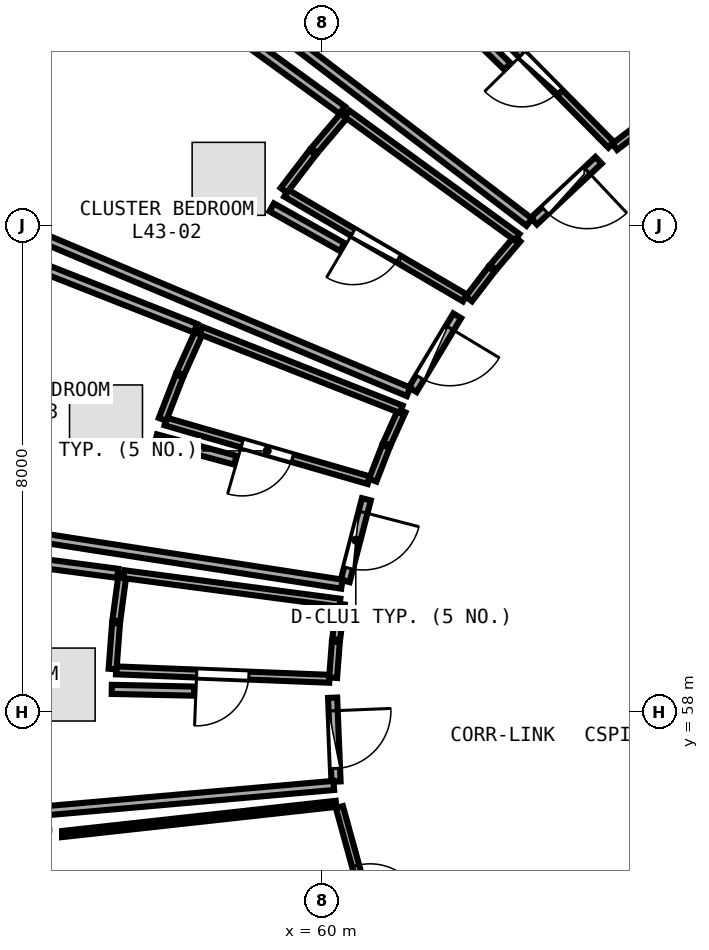
"""IFC4 building model, lengths in metres.
Left out: names, types, materials, properties, quantities, classifications, styles, units other than length and angle.
Written with IfcOpenShell. Run it as: python <this file> out.ifc"""

import sys

from ifc_helpers import new_model, si_unit, direction, frame, frame_2d, origin, place, context, subcontext, project, spatial, rectangle, extrude, element, fill, save


model = new_model("IFC4")
c1 = context("Model", 3, precision=1e-05, world=origin(), true_north=direction((0.0, 1.0)))
c2 = subcontext(c1, "Body", "Model", "MODEL_VIEW")
j1 = project(units=[si_unit("LENGTHUNIT", "METRE"), si_unit("PLANEANGLEUNIT", "RADIAN")], contexts=[c1])
p1 = place(None, origin())
s1 = spatial("IfcSite", under=j1, at=p1, CompositionType="ELEMENT")
p2 = place(p1, origin())
s2 = spatial("IfcBuilding", under=s1, at=p2, CompositionType="ELEMENT")
p3 = place(p2, frame((0.0, 0.0, 169.35)))
s3 = spatial("IfcBuildingStorey", under=s2, at=p3, CompositionType="ELEMENT", Elevation=169.35)
p4 = place(p3, frame((56.679, 71.1, 0.0), z_axis=(0.0, 0.0, 1.0), x_axis=(-0.538801521808, -0.842432739213, 0.0)))
e1 = element("IfcWall", 1, at=p4, inside=s3, PredefinedType="SOLIDWALL", context=c2, shape_type="SweptSolid", body=[
    extrude(rectangle(XDim=7.253, YDim=0.26, at=frame_2d((3.627, 0.0))), origin(), (0.0, 0.0, 1.0), 3.475),
])
p5 = place(p4, frame((3.152, 0.0, 0.0)))
e2 = element("IfcOpeningElement", 2, at=p5, cuts=e1, PredefinedType="OPENING", context=c2, shape_type="SweptSolid", body=[
    extrude(rectangle(XDim=0.95, YDim=2.1, at=frame_2d((0.475, 1.05))), frame((0.0, 0.14, 0.0), z_axis=(0.0, -1.0, 0.0), x_axis=(1.0, 0.0, 0.0)), (0.0, 0.0, 1.0), 0.28),
])
p6 = place(p4, frame((1.572, 0.0, 0.85)))
e3 = element("IfcOpeningElement", 3, at=p6, cuts=e1, PredefinedType="OPENING", context=c2, shape_type="SweptSolid", body=[
    extrude(rectangle(XDim=1.2, YDim=1.45, at=frame_2d((0.6, 0.725))), frame((0.0, 0.14, 0.0), z_axis=(0.0, -1.0, 0.0), x_axis=(1.0, 0.0, 0.0)), (0.0, 0.0, 1.0), 0.28),
])
p7 = place(p3, frame((64.758, 67.324, 0.0), z_axis=(0.0, 0.0, 1.0), x_axis=(-0.70286222458, 0.711326010531, 0.0)))
e4 = element("IfcWall", 4, at=p7, inside=s3, PredefinedType="PLUMBINGWALL", context=c2, shape_type="SweptSolid", body=[
    extrude(rectangle(XDim=3.317, YDim=0.13, at=frame_2d((1.659, 0.0))), origin(), (0.0, 0.0, 1.0), 3.175),
])
p8 = place(p7, frame((1.229, 0.0, 0.0)))
e5 = element("IfcOpeningElement", 5, at=p8, cuts=e4, PredefinedType="OPENING", context=c2, shape_type="SweptSolid", body=[
    extrude(rectangle(XDim=0.86, YDim=2.05, at=frame_2d((0.43, 1.025))), frame((0.0, 0.075, 0.0), z_axis=(0.0, -1.0, 0.0), x_axis=(1.0, 0.0, 0.0)), (0.0, 0.0, 1.0), 0.15),
])
p9 = place(p3, frame((64.55, 67.072, 0.0), z_axis=(0.0, 0.0, 1.0), x_axis=(-0.728239210945, -0.685323027223, 0.0)))
e6 = element("IfcWall", 6, at=p9, inside=s3, PredefinedType="PARTITIONING", context=c2, shape_type="SweptSolid", body=[
    extrude(rectangle(XDim=1.462, YDim=0.15, at=frame_2d((0.731, 0.0))), origin(), (0.0, 0.0, 1.0), 2.975),
])
p10 = place(p9, frame((0.256, 0.0, 0.0)))
e7 = element("IfcOpeningElement", 7, at=p10, cuts=e6, PredefinedType="OPENING", context=c2, shape_type="SweptSolid", body=[
    extrude(rectangle(XDim=0.95, YDim=2.08, at=frame_2d((0.475, 1.04))), frame((0.0, 0.085, 0.0), z_axis=(0.0, -1.0, 0.0), x_axis=(1.0, 0.0, 0.0)), (0.0, 0.0, 1.0), 0.17),
])
p11 = place(p3, frame((62.353, 64.806, 0.0), z_axis=(0.0, 0.0, 1.0), x_axis=(-0.862644088452, 0.505811404239, 0.0)))
e8 = element("IfcWall", 8, at=p11, inside=s3, PredefinedType="PLUMBINGWALL", context=c2, shape_type="SweptSolid", body=[
    extrude(rectangle(XDim=3.409, YDim=0.13, at=frame_2d((1.704, 0.0))), origin(), (0.0, 0.0, 1.0), 2.975),
])
p12 = place(p11, frame((1.274, 0.0, 0.0)))
e9 = element("IfcOpeningElement", 9, at=p12, cuts=e8, PredefinedType="OPENING", context=c2, shape_type="SweptSolid", body=[
    extrude(rectangle(XDim=0.86, YDim=2.05, at=frame_2d((0.43, 1.025))), frame((0.0, 0.075, 0.0), z_axis=(0.0, -1.0, 0.0), x_axis=(1.0, 0.0, 0.0)), (0.0, 0.0, 1.0), 0.15),
])
p13 = place(p3, frame((62.225, 64.514, 0.0), z_axis=(0.0, 0.0, 1.0), x_axis=(-0.516038492654, -0.856565393942, 0.0)))
e10 = element("IfcWall", 10, at=p13, inside=s3, PredefinedType="PARTITIONING", context=c2, shape_type="SweptSolid", body=[
    extrude(rectangle(XDim=1.419, YDim=0.15, at=frame_2d((0.709, 0.0))), origin(), (0.0, 0.0, 1.0), 3.48),
])
p14 = place(p13, frame((0.234, 0.0, 0.0)))
e11 = element("IfcOpeningElement", 11, at=p14, cuts=e10, PredefinedType="OPENING", context=c2, shape_type="SweptSolid", body=[
    extrude(rectangle(XDim=0.95, YDim=2.08, at=frame_2d((0.475, 1.04))), frame((0.0, 0.085, 0.0), z_axis=(0.0, -1.0, 0.0), x_axis=(1.0, 0.0, 0.0)), (0.0, 0.0, 1.0), 0.17),
])
p15 = place(p3, frame((60.771, 61.81, 0.0), z_axis=(0.0, 0.0, 1.0), x_axis=(-0.960701289908, 0.277584278316, 0.0)))
e12 = element("IfcWall", 12, at=p15, inside=s3, PredefinedType="PLUMBINGWALL", context=c2, shape_type="SweptSolid", body=[
    extrude(rectangle(XDim=3.479, YDim=0.13, at=frame_2d((1.739, 0.0))), origin(), (0.0, 0.0, 1.0), 3.175),
])
p16 = place(p15, frame((1.309, 0.0, 0.0)))
e13 = element("IfcOpeningElement", 13, at=p16, cuts=e12, PredefinedType="OPENING", context=c2, shape_type="SweptSolid", body=[
    extrude(rectangle(XDim=0.86, YDim=2.05, at=frame_2d((0.43, 1.025))), frame((0.0, 0.075, 0.0), z_axis=(0.0, -1.0, 0.0), x_axis=(1.0, 0.0, 0.0)), (0.0, 0.0, 1.0), 0.15),
])
p17 = place(p3, frame((60.732, 61.496, 0.0), z_axis=(0.0, 0.0, 1.0), x_axis=(-0.251297806583, -0.967909816257, 0.0)))
e14 = element("IfcWall", 14, at=p17, inside=s3, PredefinedType="PARTITIONING", context=c2, shape_type="SweptSolid", body=[
    extrude(rectangle(XDim=1.388, YDim=0.15, at=frame_2d((0.694, 0.0))), origin(), (0.0, 0.0, 1.0), 3.48),
])
p18 = place(p17, frame((0.219, 0.0, 0.0)))
e15 = element("IfcOpeningElement", 15, at=p18, cuts=e14, PredefinedType="OPENING", context=c2, shape_type="SweptSolid", body=[
    extrude(rectangle(XDim=0.95, YDim=2.08, at=frame_2d((0.475, 1.04))), frame((0.0, 0.085, 0.0), z_axis=(0.0, -1.0, 0.0), x_axis=(1.0, 0.0, 0.0)), (0.0, 0.0, 1.0), 0.17),
])
p19 = place(p3, frame((60.123, 58.544, 0.0), z_axis=(0.0, 0.0, 1.0), x_axis=(-0.999224670523, 0.039370773652, 0.0)))
e16 = element("IfcWall", 16, at=p19, inside=s3, PredefinedType="PLUMBINGWALL", context=c2, shape_type="SweptSolid", body=[
    extrude(rectangle(XDim=3.51, YDim=0.13, at=frame_2d((1.755, 0.0))), origin(), (0.0, 0.0, 1.0), 3.175),
])
p20 = place(p19, frame((1.325, 0.0, 0.0)))
e17 = element("IfcOpeningElement", 17, at=p20, cuts=e16, PredefinedType="OPENING", context=c2, shape_type="SweptSolid", body=[
    extrude(rectangle(XDim=0.86, YDim=2.05, at=frame_2d((0.43, 1.025))), frame((0.0, 0.075, 0.0), z_axis=(0.0, -1.0, 0.0), x_axis=(1.0, 0.0, 0.0)), (0.0, 0.0, 1.0), 0.15),
])
p21 = place(p3, frame((60.177, 58.233, 0.0), z_axis=(0.0, 0.0, 1.0), x_axis=(0.040688656331, -0.999171873726, 0.0)))
e18 = element("IfcWall", 18, at=p21, inside=s3, PredefinedType="PARTITIONING", context=c2, shape_type="SweptSolid", body=[
    extrude(rectangle(XDim=1.38, YDim=0.15, at=frame_2d((0.69, 0.0))), origin(), (0.0, 0.0, 1.0), 2.975),
])
p22 = place(p21, frame((0.215, 0.0, 0.0)))
e19 = element("IfcOpeningElement", 19, at=p22, cuts=e18, PredefinedType="OPENING", context=c2, shape_type="SweptSolid", body=[
    extrude(rectangle(XDim=0.95, YDim=2.08, at=frame_2d((0.475, 1.04))), frame((0.0, 0.085, 0.0), z_axis=(0.0, -1.0, 0.0), x_axis=(1.0, 0.0, 0.0)), (0.0, 0.0, 1.0), 0.17),
])
p23 = place(p3, frame((60.288, 56.434, 0.0), z_axis=(0.0, 0.0, 1.0), x_axis=(0.265473290907, -0.964118214647, 0.0)))
e20 = element("IfcWall", 20, at=p23, inside=s3, PredefinedType="PARTITIONING", context=c2, shape_type="SweptSolid", body=[
    extrude(rectangle(XDim=2.901, YDim=0.12, at=frame_2d((1.451, 0.0))), origin(), (0.0, 0.0, 1.0), 3.235),
])
p24 = place(p23, frame((1.001, 0.0, 0.0)))
e21 = element("IfcOpeningElement", 21, at=p24, cuts=e20, PredefinedType="OPENING", context=c2, shape_type="SweptSolid", body=[
    extrude(rectangle(XDim=0.9, YDim=2.08, at=frame_2d((0.45, 1.04))), frame((0.0, 0.07, 0.0), z_axis=(0.0, -1.0, 0.0), x_axis=(1.0, 0.0, 0.0)), (0.0, 0.0, 1.0), 0.14),
])
p25 = place(p3, frame((66.242, 68.337, 0.0), z_axis=(0.0, 0.0, 1.0), x_axis=(-0.598416617992, 0.801185091793, 0.0)))
e22 = element("IfcWall", 22, at=p25, inside=s3, PredefinedType="PARTITIONING", context=c2, shape_type="SweptSolid", body=[
    extrude(rectangle(XDim=7.629, YDim=0.1, at=frame_2d((3.814, 0.0))), origin(), (0.0, 0.0, 1.0), 2.975),
])
p26 = place(p3, frame((65.318, 67.675, 0.0), z_axis=(0.0, 0.0, 1.0), x_axis=(-0.796221861686, -0.605004749546, 0.0)))
e23 = element("IfcWall", 23, at=p26, inside=s3, PredefinedType="PLUMBINGWALL", context=c2, shape_type="SweptSolid", body=[
    extrude(rectangle(XDim=0.631, YDim=0.13, at=frame_2d((0.315, 0.0))), origin(), (0.0, 0.0, 1.0), 2.975),
])
p27 = place(p3, frame((63.773, 70.706, 0.0), z_axis=(0.0, 0.0, 1.0), x_axis=(0.625916574892, -0.779890018704, 0.0)))
e24 = element("IfcWall", 24, at=p27, inside=s3, PredefinedType="PLUMBINGWALL", context=c2, shape_type="SweptSolid", body=[
    extrude(rectangle(XDim=3.362, YDim=0.13, at=frame_2d((1.681, 0.0))), origin(), (0.0, 0.0, 1.0), 2.975),
])
p28 = place(p3, frame((63.41, 66.053, 0.0), z_axis=(0.0, 0.0, 1.0), x_axis=(-0.794605605324, 0.607125960561, 0.0)))
e25 = element("IfcWall", 25, at=p28, inside=s3, PredefinedType="PARTITIONING", context=c2, shape_type="SweptSolid", body=[
    extrude(rectangle(XDim=6.878, YDim=0.15, at=frame_2d((3.439, 0.0))), origin(), (0.0, 0.0, 1.0), 2.975),
])
p29 = place(p3, frame((62.127, 69.515, 0.0), z_axis=(0.0, 0.0, 1.0), x_axis=(0.716511036514, -0.697575755422, 0.0)))
e26 = element("IfcWall", 26, at=p29, inside=s3, PredefinedType="PARTITIONING", context=c2, shape_type="SweptSolid", body=[
    extrude(rectangle(XDim=1.289, YDim=0.15, at=frame_2d((0.645, 0.0))), origin(), (0.0, 0.0, 1.0), 3.175),
])
p30 = place(p3, frame((63.214, 65.779, 0.0), z_axis=(0.0, 0.0, 1.0), x_axis=(-0.647556442318, -0.762017489309, 0.0)))
e27 = element("IfcWall", 27, at=p30, inside=s3, PredefinedType="PLUMBINGWALL", context=c2, shape_type="SweptSolid", body=[
    extrude(rectangle(XDim=0.616, YDim=0.13, at=frame_2d((0.308, 0.0))), origin(), (0.0, 0.0, 1.0), 3.48),
])
p31 = place(p3, frame((62.79, 65.278, 0.0), z_axis=(0.0, 0.0, 1.0), x_axis=(-0.608322742198, -0.793689763903, 0.0)))
e28 = element("IfcWall", 28, at=p31, inside=s3, PredefinedType="PLUMBINGWALL", context=c2, shape_type="SweptSolid", body=[
    extrude(rectangle(XDim=0.613, YDim=0.13, at=frame_2d((0.306, 0.0))), origin(), (0.0, 0.0, 1.0), 2.975),
])
p32 = place(p3, frame((59.373, 66.577, 0.0), z_axis=(0.0, 0.0, 1.0), x_axis=(0.607392357166, 0.794401991724, 0.0)))
e29 = element("IfcWall", 29, at=p32, inside=s3, PredefinedType="PLUMBINGWALL", context=c2, shape_type="SweptSolid", body=[
    extrude(rectangle(XDim=0.785, YDim=0.13, at=frame_2d((0.392, 0.0))), origin(), (0.0, 0.0, 1.0), 3.48),
])
p33 = place(p3, frame((59.875, 67.231, 0.0), z_axis=(0.0, 0.0, 1.0), x_axis=(0.646677421024, 0.762763602395, 0.0)))
e30 = element("IfcWall", 30, at=p33, inside=s3, PredefinedType="PLUMBINGWALL", context=c2, shape_type="SweptSolid", body=[
    extrude(rectangle(XDim=0.789, YDim=0.13, at=frame_2d((0.394, 0.0))), origin(), (0.0, 0.0, 1.0), 3.175),
])
p34 = place(p3, frame((60.414, 67.836, 0.0), z_axis=(0.0, 0.0, 1.0), x_axis=(0.809212412411, -0.587516188372, 0.0)))
e31 = element("IfcWall", 31, at=p34, inside=s3, PredefinedType="PLUMBINGWALL", context=c2, shape_type="SweptSolid", body=[
    extrude(rectangle(XDim=3.456, YDim=0.13, at=frame_2d((1.728, 0.0))), origin(), (0.0, 0.0, 1.0), 3.175),
])
p35 = place(p3, frame((61.425, 63.262, 0.0), z_axis=(0.0, 0.0, 1.0), x_axis=(-0.921852058971, 0.387541973688, 0.0)))
e32 = element("IfcWall", 32, at=p35, inside=s3, PredefinedType="PARTITIONING", context=c2, shape_type="SweptSolid", body=[
    extrude(rectangle(XDim=8.033, YDim=0.15, at=frame_2d((4.016, 0.0))), origin(), (0.0, 0.0, 1.0), 2.975),
])
p36 = place(p3, frame((57.554, 69.918, 0.0), z_axis=(0.0, 0.0, 1.0), x_axis=(0.808868126213, -0.587990097192, 0.0)))
e33 = element("IfcWall", 33, at=p36, inside=s3, PredefinedType="PARTITIONING", context=c2, shape_type="SweptSolid", body=[
    extrude(rectangle(XDim=3.438, YDim=0.15, at=frame_2d((1.719, 0.0))), origin(), (0.0, 0.0, 1.0), 3.235),
])
p37 = place(p3, frame((59.174, 66.296, 0.0), z_axis=(0.0, 0.0, 1.0), x_axis=(0.871883609801, -0.489713151712, 0.0)))
e34 = element("IfcWall", 34, at=p37, inside=s3, PredefinedType="PARTITIONING", context=c2, shape_type="SweptSolid", body=[
    extrude(rectangle(XDim=1.333, YDim=0.15, at=frame_2d((0.666, 0.0))), origin(), (0.0, 0.0, 1.0), 3.175),
])
p38 = place(p3, frame((61.315, 62.952, 0.0), z_axis=(0.0, 0.0, 1.0), x_axis=(-0.411193988453, -0.91154786153, 0.0)))
e35 = element("IfcWall", 35, at=p38, inside=s3, PredefinedType="PLUMBINGWALL", context=c2, shape_type="SweptSolid", body=[
    extrude(rectangle(XDim=0.6, YDim=0.13, at=frame_2d((0.3, 0.0))), origin(), (0.0, 0.0, 1.0), 3.235),
])
p39 = place(p3, frame((61.053, 62.368, 0.0), z_axis=(0.0, 0.0, 1.0), x_axis=(-0.362426543202, -0.932012339394, 0.0)))
e36 = element("IfcWall", 36, at=p39, inside=s3, PredefinedType="PLUMBINGWALL", context=c2, shape_type="SweptSolid", body=[
    extrude(rectangle(XDim=0.597, YDim=0.13, at=frame_2d((0.299, 0.0))), origin(), (0.0, 0.0, 1.0), 3.235),
])
p40 = place(p3, frame((57.379, 62.811, 0.0), z_axis=(0.0, 0.0, 1.0), x_axis=(0.361307204634, 0.932446837026, 0.0)))
e37 = element("IfcWall", 37, at=p40, inside=s3, PredefinedType="PLUMBINGWALL", context=c2, shape_type="SweptSolid", body=[
    extrude(rectangle(XDim=0.766, YDim=0.13, at=frame_2d((0.383, 0.0))), origin(), (0.0, 0.0, 1.0), 3.48),
])
p41 = place(p3, frame((57.671, 63.561, 0.0), z_axis=(0.0, 0.0, 1.0), x_axis=(0.411356558761, 0.911474509553, 0.0)))
e38 = element("IfcWall", 38, at=p41, inside=s3, PredefinedType="PLUMBINGWALL", context=c2, shape_type="SweptSolid", body=[
    extrude(rectangle(XDim=0.767, YDim=0.13, at=frame_2d((0.384, 0.0))), origin(), (0.0, 0.0, 1.0), 3.48),
])
p42 = place(p3, frame((58.014, 64.272, 0.0), z_axis=(0.0, 0.0, 1.0), x_axis=(0.930594484037, -0.366051780871, 0.0)))
e39 = element("IfcWall", 39, at=p42, inside=s3, PredefinedType="PLUMBINGWALL", context=c2, shape_type="SweptSolid", body=[
    extrude(rectangle(XDim=3.536, YDim=0.13, at=frame_2d((1.768, 0.0))), origin(), (0.0, 0.0, 1.0), 3.175),
])
p43 = place(p3, frame((60.329, 60.1, 0.0), z_axis=(0.0, 0.0, 1.0), x_axis=(-0.988280426205, 0.152649268523, 0.0)))
e40 = element("IfcWall", 40, at=p43, inside=s3, PredefinedType="PARTITIONING", context=c2, shape_type="SweptSolid", body=[
    extrude(rectangle(XDim=8.149, YDim=0.15, at=frame_2d((4.074, 0.0))), origin(), (0.0, 0.0, 1.0), 3.025),
])
p44 = place(p3, frame((53.799, 65.933, 0.0), z_axis=(0.0, 0.0, 1.0), x_axis=(0.930447107731, -0.366426226839, 0.0)))
e41 = element("IfcWall", 41, at=p44, inside=s3, PredefinedType="PARTITIONING", context=c2, shape_type="SweptSolid", body=[
    extrude(rectangle(XDim=4.431, YDim=0.15, at=frame_2d((2.215, 0.0))), origin(), (0.0, 0.0, 1.0), 2.975),
])
p45 = place(p3, frame((57.269, 62.492, 0.0), z_axis=(0.0, 0.0, 1.0), x_axis=(0.965540944104, -0.260251196461, 0.0)))
e42 = element("IfcWall", 42, at=p45, inside=s3, PredefinedType="PARTITIONING", context=c2, shape_type="SweptSolid", body=[
    extrude(rectangle(XDim=1.355, YDim=0.15, at=frame_2d((0.678, 0.0))), origin(), (0.0, 0.0, 1.0), 3.175),
])
for number, where, z_axis, x_axis in (
    (43, (60.312, 59.774, 0.0), (0.0, 0.0, 1.0), (-0.133, -0.991, 0.0)),
    (44, (60.229, 59.15, 0.0), (0.0, 0.0, 1.0), (-0.076, -0.997, 0.0)),
):
    element("IfcWall", number, at=place(p3, frame(where, z_axis=z_axis, x_axis=x_axis)), inside=s3, PredefinedType="PLUMBINGWALL", context=c2, shape_type="SweptSolid", body=[
        extrude(rectangle(XDim=0.59, YDim=0.13, at=frame_2d((0.295, 0.0))), origin(), (0.0, 0.0, 1.0), 3.48),
    ])
p46 = place(p3, frame((56.558, 58.705, 0.0), z_axis=(0.0, 0.0, 1.0), x_axis=(0.075312246351, 0.997159999975, 0.0)))
e45 = element("IfcWall", 45, at=p46, inside=s3, PredefinedType="PLUMBINGWALL", context=c2, shape_type="SweptSolid", body=[
    extrude(rectangle(XDim=0.755, YDim=0.13, at=frame_2d((0.378, 0.0))), origin(), (0.0, 0.0, 1.0), 3.48),
])
p47 = place(p3, frame((56.619, 59.498, 0.0), z_axis=(0.0, 0.0, 1.0), x_axis=(0.133009537515, 0.9911147577, 0.0)))
e46 = element("IfcWall", 46, at=p47, inside=s3, PredefinedType="PLUMBINGWALL", context=c2, shape_type="SweptSolid", body=[
    extrude(rectangle(XDim=0.756, YDim=0.13, at=frame_2d((0.378, 0.0))), origin(), (0.0, 0.0, 1.0), 3.48),
])
p48 = place(p3, frame((56.742, 60.264, 0.0), z_axis=(0.0, 0.0, 1.0), x_axis=(0.991446642818, -0.130512660092, 0.0)))
e47 = element("IfcWall", 47, at=p48, inside=s3, PredefinedType="PLUMBINGWALL", context=c2, shape_type="SweptSolid", body=[
    extrude(rectangle(XDim=3.584, YDim=0.13, at=frame_2d((1.792, 0.0))), origin(), (0.0, 0.0, 1.0), 3.175),
])
p49 = place(p3, frame((60.195, 56.791, 0.0), z_axis=(0.0, 0.0, 1.0), x_axis=(-0.996155607827, -0.087601398364, 0.0)))
e48 = element("IfcWall", 48, at=p49, inside=s3, PredefinedType="PARTITIONING", context=c2, shape_type="SweptSolid", body=[
    extrude(rectangle(XDim=8.163, YDim=0.15, at=frame_2d((4.082, 0.0))), origin(), (0.0, 0.0, 1.0), 3.025),
])
p50 = place(p3, frame((52.191, 60.865, 0.0), z_axis=(0.0, 0.0, 1.0), x_axis=(0.991434667169, -0.130603601543, 0.0)))
e49 = element("IfcWall", 49, at=p50, inside=s3, PredefinedType="PARTITIONING", context=c2, shape_type="SweptSolid", body=[
    extrude(rectangle(XDim=4.49, YDim=0.15, at=frame_2d((2.245, 0.0))), origin(), (0.0, 0.0, 1.0), 3.025),
])
p51 = place(p3, frame((56.544, 58.37, 0.0), z_axis=(0.0, 0.0, 1.0), x_axis=(0.999773811605, -0.021267948399, 0.0)))
e50 = element("IfcWall", 50, at=p51, inside=s3, PredefinedType="PARTITIONING", context=c2, shape_type="SweptSolid", body=[
    extrude(rectangle(XDim=1.354, YDim=0.15, at=frame_2d((0.677, 0.0))), origin(), (0.0, 0.0, 1.0), 3.175),
])
p52 = place(p3, frame((52.123, 55.594, 0.0), z_axis=(0.0, 0.0, 1.0), x_axis=(0.993977526639, 0.109584107134, 0.0)))
e51 = element("IfcWall", 51, at=p52, inside=s3, PredefinedType="PARTITIONING", context=c2, shape_type="SweptSolid", body=[
    extrude(rectangle(XDim=8.158, YDim=0.1, at=frame_2d((4.079, 0.0))), origin(), (0.0, 0.0, 1.0), 3.025),
])
p53 = place(p6, origin())
e52 = element("IfcWindow", 52, at=p53, inside=s3, PartitioningType="SINGLE_PANEL", PredefinedType="WINDOW", context=c2, shape_type="SweptSolid", body=[
    extrude(rectangle(XDim=1.2, YDim=1.45, at=frame_2d((0.6, 0.725))), frame((0.0, 0.03, 0.0), z_axis=(0.0, -1.0, 0.0), x_axis=(1.0, 0.0, 0.0)), (0.0, 0.0, 1.0), 0.06),
])
fill(e3, e52)
p54 = place(p8, origin())
e53 = element("IfcDoor", 53, at=p54, inside=s3, OperationType="SINGLE_SWING_RIGHT", PredefinedType="DOOR", context=c2, shape_type="SweptSolid", body=[
    extrude(rectangle(XDim=0.86, YDim=2.05, at=frame_2d((0.43, 1.025))), frame((0.0, 0.025, 0.0), z_axis=(0.0, -1.0, 0.0), x_axis=(1.0, 0.0, 0.0)), (0.0, 0.0, 1.0), 0.05),
])
fill(e5, e53)
p55 = place(p10, origin())
e54 = element("IfcDoor", 54, at=p55, inside=s3, OperationType="SINGLE_SWING_LEFT", PredefinedType="DOOR", context=c2, shape_type="SweptSolid", body=[
    extrude(rectangle(XDim=0.95, YDim=2.08, at=frame_2d((0.475, 1.04))), frame((0.0, 0.025, 0.0), z_axis=(0.0, -1.0, 0.0), x_axis=(1.0, 0.0, 0.0)), (0.0, 0.0, 1.0), 0.05),
])
fill(e7, e54)
p56 = place(p12, origin())
e55 = element("IfcDoor", 55, at=p56, inside=s3, OperationType="SINGLE_SWING_RIGHT", PredefinedType="DOOR", context=c2, shape_type="SweptSolid", body=[
    extrude(rectangle(XDim=0.86, YDim=2.05, at=frame_2d((0.43, 1.025))), frame((0.0, 0.025, 0.0), z_axis=(0.0, -1.0, 0.0), x_axis=(1.0, 0.0, 0.0)), (0.0, 0.0, 1.0), 0.05),
])
fill(e9, e55)
p57 = place(p14, origin())
e56 = element("IfcDoor", 56, at=p57, inside=s3, OperationType="SINGLE_SWING_LEFT", PredefinedType="DOOR", context=c2, shape_type="SweptSolid", body=[
    extrude(rectangle(XDim=0.95, YDim=2.08, at=frame_2d((0.475, 1.04))), frame((0.0, 0.025, 0.0), z_axis=(0.0, -1.0, 0.0), x_axis=(1.0, 0.0, 0.0)), (0.0, 0.0, 1.0), 0.05),
])
fill(e11, e56)
p58 = place(p16, origin())
e57 = element("IfcDoor", 57, at=p58, inside=s3, OperationType="SINGLE_SWING_RIGHT", PredefinedType="DOOR", context=c2, shape_type="SweptSolid", body=[
    extrude(rectangle(XDim=0.86, YDim=2.05, at=frame_2d((0.43, 1.025))), frame((0.0, 0.025, 0.0), z_axis=(0.0, -1.0, 0.0), x_axis=(1.0, 0.0, 0.0)), (0.0, 0.0, 1.0), 0.05),
])
fill(e13, e57)
p59 = place(p18, origin())
e58 = element("IfcDoor", 58, at=p59, inside=s3, OperationType="SINGLE_SWING_LEFT", PredefinedType="DOOR", context=c2, shape_type="SweptSolid", body=[
    extrude(rectangle(XDim=0.95, YDim=2.08, at=frame_2d((0.475, 1.04))), frame((0.0, 0.025, 0.0), z_axis=(0.0, -1.0, 0.0), x_axis=(1.0, 0.0, 0.0)), (0.0, 0.0, 1.0), 0.05),
])
fill(e15, e58)
p60 = place(p20, origin())
e59 = element("IfcDoor", 59, at=p60, inside=s3, OperationType="SINGLE_SWING_RIGHT", PredefinedType="DOOR", context=c2, shape_type="SweptSolid", body=[
    extrude(rectangle(XDim=0.86, YDim=2.05, at=frame_2d((0.43, 1.025))), frame((0.0, 0.025, 0.0), z_axis=(0.0, -1.0, 0.0), x_axis=(1.0, 0.0, 0.0)), (0.0, 0.0, 1.0), 0.05),
])
fill(e17, e59)
p61 = place(p22, origin())
e60 = element("IfcDoor", 60, at=p61, inside=s3, OperationType="SINGLE_SWING_LEFT", PredefinedType="DOOR", context=c2, shape_type="SweptSolid", body=[
    extrude(rectangle(XDim=0.95, YDim=2.08, at=frame_2d((0.475, 1.04))), frame((0.0, 0.025, 0.0), z_axis=(0.0, -1.0, 0.0), x_axis=(1.0, 0.0, 0.0)), (0.0, 0.0, 1.0), 0.05),
])
fill(e19, e60)
p62 = place(p24, origin())
e61 = element("IfcDoor", 61, at=p62, inside=s3, OperationType="SINGLE_SWING_RIGHT", PredefinedType="DOOR", context=c2, shape_type="SweptSolid", body=[
    extrude(rectangle(XDim=0.9, YDim=2.08, at=frame_2d((0.45, 1.04))), frame((0.0, 0.025, 0.0), z_axis=(0.0, -1.0, 0.0), x_axis=(1.0, 0.0, 0.0)), (0.0, 0.0, 1.0), 0.05),
])
fill(e21, e61)
save(model, sys.argv[1])
